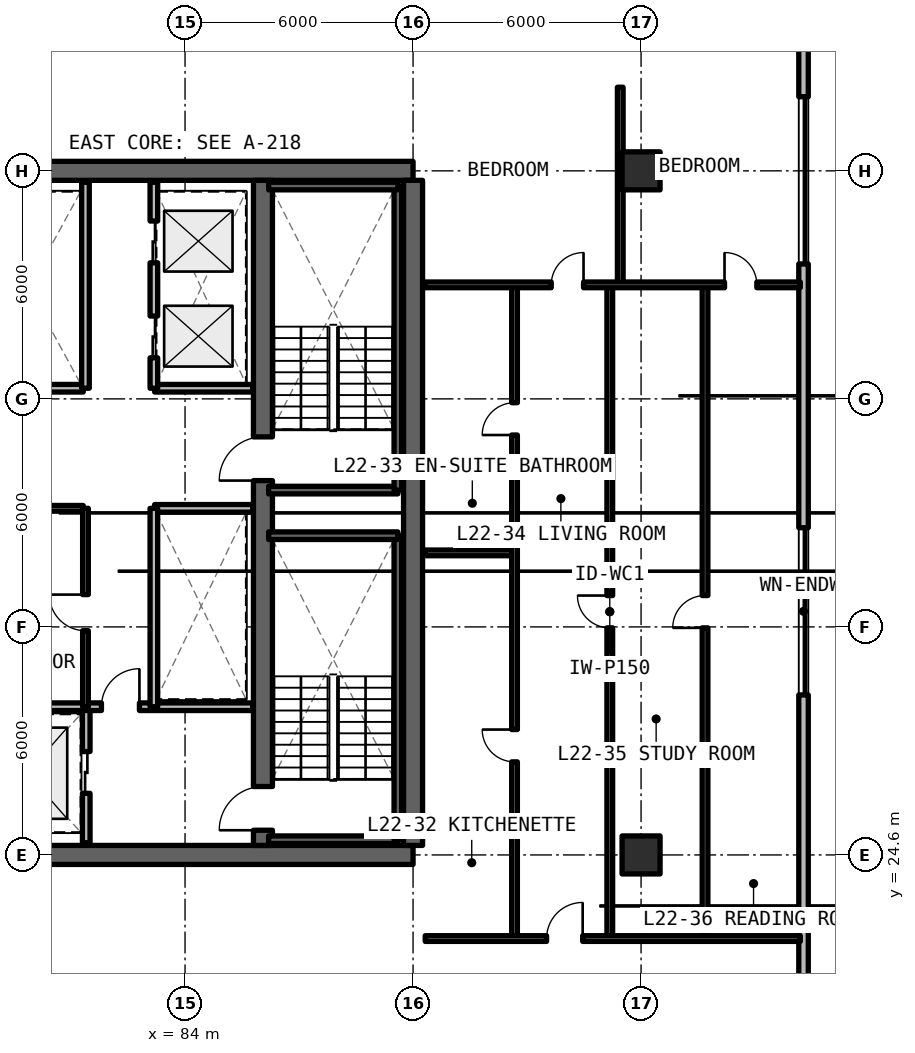
"""IFC4 building model, lengths in metres.
Left out: names, types, materials, properties, quantities, classifications, styles, units other than length and angle.
Written with IfcOpenShell. Run it as: python <this file> out.ifc"""

import sys

from ifc_helpers import new_model, si_unit, direction, frame, frame_2d, origin, origin_2d, place, context, subcontext, project, spatial, rectangle, extrude, element, fill, save


model = new_model("IFC4")
c1 = context("Model", 3, precision=1e-05, world=origin(), true_north=direction((0.0, 1.0)))
c2 = subcontext(c1, "Body", "Model", "MODEL_VIEW")
j1 = project(units=[si_unit("LENGTHUNIT", "METRE"), si_unit("PLANEANGLEUNIT", "RADIAN")], contexts=[c1])
p1 = place(None, origin())
s1 = spatial("IfcSite", under=j1, at=p1, CompositionType="ELEMENT")
p2 = place(p1, origin())
s2 = spatial("IfcBuilding", under=s1, at=p2, CompositionType="ELEMENT")
p3 = place(p2, frame((0.0, 0.0, 82.17)))
s3 = spatial("IfcBuildingStorey", under=s2, at=p3, CompositionType="ELEMENT", Elevation=82.17)
for number, where, z_axis, x_axis in (
    (1, (78.0, 24.6, 0.0), (0.0, 0.0, 1.0), (1.0, 0.0, 0.0)),
    (2, (90.0, 42.6, 0.0), (0.0, 0.0, 1.0), (-1.0, 0.0, 0.0)),
):
    element("IfcWall", number, at=place(p3, frame(where, z_axis=z_axis, x_axis=x_axis)), inside=s3, PredefinedType="SHEAR", context=c2, shape_type="SweptSolid", body=[
        extrude(rectangle(XDim=12.0, YDim=0.5, at=frame_2d((6.0, 0.0))), origin(), (0.0, 0.0, 1.0), 3.3),
    ])
p4 = place(p3, frame((90.0, 24.85, 0.0), z_axis=(0.0, 0.0, 1.0), x_axis=(0.0, 1.0, 0.0)))
e3 = element("IfcWall", 3, at=p4, inside=s3, PredefinedType="SHEAR", context=c2, shape_type="SweptSolid", body=[
    extrude(rectangle(XDim=17.5, YDim=0.5, at=frame_2d((8.75, 0.0))), origin(), (0.0, 0.0, 1.0), 3.3),
])
p5 = place(p3, frame((86.05, 24.85, 0.0), z_axis=(0.0, 0.0, 1.0), x_axis=(0.0, 1.0, 0.0)))
e4 = element("IfcWall", 4, at=p5, inside=s3, PredefinedType="SHEAR", context=c2, shape_type="SweptSolid", body=[
    extrude(rectangle(XDim=17.5, YDim=0.5, at=frame_2d((8.75, 0.0))), origin(), (0.0, 0.0, 1.0), 3.3),
])
p6 = place(p5, frame((0.4, 0.0, 0.0)))
e5 = element("IfcOpeningElement", 5, at=p6, cuts=e4, PredefinedType="OPENING", context=c2, shape_type="SweptSolid", body=[
    extrude(rectangle(XDim=1.15, YDim=2.15, at=frame_2d((0.575, 1.075))), frame((0.0, 0.26, 0.0), z_axis=(0.0, -1.0, 0.0), x_axis=(1.0, 0.0, 0.0)), (0.0, 0.0, 1.0), 0.52),
])
p7 = place(p5, frame((9.6, 0.0, 0.0)))
e6 = element("IfcOpeningElement", 6, at=p7, cuts=e4, PredefinedType="OPENING", context=c2, shape_type="SweptSolid", body=[
    extrude(rectangle(XDim=1.15, YDim=2.15, at=frame_2d((0.575, 1.075))), frame((0.0, 0.26, 0.0), z_axis=(0.0, -1.0, 0.0), x_axis=(1.0, 0.0, 0.0)), (0.0, 0.0, 1.0), 0.52),
])
for number, where, z_axis, x_axis in (
    (7, (96.0, 24.6, 0.0), (0.0, 0.0, 1.0), (1.0, 0.0, 0.0)),
    (8, (96.0, 42.6, 0.0), (0.0, 0.0, 1.0), (1.0, 0.0, 0.0)),
):
    element("IfcColumn", number, at=place(p3, frame(where, z_axis=z_axis, x_axis=x_axis)), inside=s3, PredefinedType="COLUMN", context=c2, shape_type="SweptSolid", body=[
        extrude(rectangle(XDim=1.0, YDim=1.0, at=origin_2d()), origin(), (0.0, 0.0, 1.0), 3.3),
    ])
p8 = place(p3, frame((100.275, 13.852, 0.0), z_axis=(0.0, 0.0, 1.0), x_axis=(0.0, 1.0, 0.0)))
e9 = element("IfcWall", 9, at=p8, inside=s3, PredefinedType="SOLIDWALL", context=c2, shape_type="SweptSolid", body=[
    extrude(rectangle(XDim=39.496, YDim=0.25, at=frame_2d((19.748, 0.0))), origin(), (0.0, 0.0, 1.0), 3.08),
])
p9 = place(p8, frame((36.448, 0.0, 0.0)))
e10 = element("IfcOpeningElement", 10, at=p9, cuts=e9, PredefinedType="OPENING", context=c2, shape_type="SweptSolid", body=[
    extrude(rectangle(XDim=1.1, YDim=2.15, at=frame_2d((0.55, 1.075))), frame((0.0, 0.135, 0.0), z_axis=(0.0, -1.0, 0.0), x_axis=(1.0, 0.0, 0.0)), (0.0, 0.0, 1.0), 0.27),
])
p10 = place(p8, frame((14.958, 0.0, 0.78)))
e11 = element("IfcOpeningElement", 11, at=p10, cuts=e9, PredefinedType="OPENING", context=c2, shape_type="SweptSolid", body=[
    extrude(rectangle(XDim=4.4, YDim=1.66, at=frame_2d((2.2, 0.83))), frame((0.0, 0.135, 0.0), z_axis=(0.0, -1.0, 0.0), x_axis=(1.0, 0.0, 0.0)), (0.0, 0.0, 1.0), 0.27),
])
p11 = place(p8, frame((26.298, 0.0, 0.78)))
e12 = element("IfcOpeningElement", 12, at=p11, cuts=e9, PredefinedType="OPENING", context=c2, shape_type="SweptSolid", body=[
    extrude(rectangle(XDim=4.4, YDim=1.66, at=frame_2d((2.2, 0.83))), frame((0.0, 0.135, 0.0), z_axis=(0.0, -1.0, 0.0), x_axis=(1.0, 0.0, 0.0)), (0.0, 0.0, 1.0), 0.27),
])
p12 = place(p8, frame((2.454, 0.0, 0.78)))
e13 = element("IfcOpeningElement", 13, at=p12, cuts=e9, PredefinedType="OPENING", context=c2, shape_type="SweptSolid", body=[
    extrude(rectangle(XDim=1.4, YDim=1.65, at=frame_2d((0.7, 0.825))), frame((0.0, 0.135, 0.0), z_axis=(0.0, -1.0, 0.0), x_axis=(1.0, 0.0, 0.0)), (0.0, 0.0, 1.0), 0.27),
])
p13 = place(p3, frame((81.4, 24.92, 0.0), z_axis=(0.0, 0.0, 1.0), x_axis=(0.0, 1.0, 0.0)))
e14 = element("IfcWall", 14, at=p13, inside=s3, PredefinedType="SOLIDWALL", context=c2, shape_type="SweptSolid", body=[
    extrude(rectangle(XDim=3.58, YDim=0.2, at=frame_2d((1.79, 0.0))), origin(), (0.0, 0.0, 1.0), 2.35),
])
p14 = place(p13, frame((1.3, 0.0, 0.0)))
e15 = element("IfcOpeningElement", 15, at=p14, cuts=e14, PredefinedType="OPENING", context=c2, shape_type="SweptSolid", body=[
    extrude(rectangle(XDim=1.1, YDim=2.2, at=frame_2d((0.55, 1.1))), frame((0.0, 0.11, 0.0), z_axis=(0.0, -1.0, 0.0), x_axis=(1.0, 0.0, 0.0)), (0.0, 0.0, 1.0), 0.22),
])
p15 = place(p3, frame((78.27, 28.5, 0.0), z_axis=(0.0, 0.0, 1.0), x_axis=(1.0, 0.0, 0.0)))
e16 = element("IfcWall", 16, at=p15, inside=s3, PredefinedType="SOLIDWALL", context=c2, shape_type="SweptSolid", body=[
    extrude(rectangle(XDim=7.51, YDim=0.2, at=frame_2d((3.755, 0.0))), origin(), (0.0, 0.0, 1.0), 2.35),
])
p16 = place(p15, frame((3.53, 0.0, 0.0)))
e17 = element("IfcOpeningElement", 17, at=p16, cuts=e16, PredefinedType="OPENING", context=c2, shape_type="SweptSolid", body=[
    extrude(rectangle(XDim=1.0, YDim=2.15, at=frame_2d((0.5, 1.075))), frame((0.0, 0.11, 0.0), z_axis=(0.0, -1.0, 0.0), x_axis=(1.0, 0.0, 0.0)), (0.0, 0.0, 1.0), 0.22),
])
p17 = place(p3, frame((83.2, 33.72, 0.0), z_axis=(0.0, 0.0, 1.0), x_axis=(1.0, 0.0, 0.0)))
e18 = element("IfcWall", 18, at=p17, inside=s3, PredefinedType="SOLIDWALL", context=c2, shape_type="SweptSolid", body=[
    extrude(rectangle(XDim=2.58, YDim=0.2, at=frame_2d((1.29, 0.0))), origin(), (0.0, 0.0, 1.0), 2.35),
])
p18 = place(p3, frame((83.18, 28.5, 0.0), z_axis=(0.0, 0.0, 1.0), x_axis=(0.0, 1.0, 0.0)))
e19 = element("IfcWall", 19, at=p18, inside=s3, PredefinedType="SOLIDWALL", context=c2, shape_type="SweptSolid", body=[
    extrude(rectangle(XDim=5.22, YDim=0.2, at=frame_2d((2.61, 0.0))), origin(), (0.0, 0.0, 1.0), 2.35),
])
p19 = place(p3, frame((79.76, 33.72, 0.0), z_axis=(0.0, 0.0, 1.0), x_axis=(1.0, 0.0, 0.0)))
e20 = element("IfcWall", 20, at=p19, inside=s3, PredefinedType="SOLIDWALL", context=c2, shape_type="SweptSolid", body=[
    extrude(rectangle(XDim=1.56, YDim=0.15, at=frame_2d((0.78, 0.0))), origin(), (0.0, 0.0, 1.0), 2.35),
])
p20 = place(p3, frame((81.38, 28.5, 0.0), z_axis=(0.0, 0.0, 1.0), x_axis=(0.0, 1.0, 0.0)))
e21 = element("IfcWall", 21, at=p20, inside=s3, PredefinedType="SOLIDWALL", context=c2, shape_type="SweptSolid", body=[
    extrude(rectangle(XDim=5.22, YDim=0.15, at=frame_2d((2.61, 0.0))), origin(), (0.0, 0.0, 1.0), 2.35),
])
p21 = place(p20, frame((2.0, 0.0, 0.0)))
e22 = element("IfcOpeningElement", 22, at=p21, cuts=e21, PredefinedType="OPENING", context=c2, shape_type="SweptSolid", body=[
    extrude(rectangle(XDim=0.95, YDim=2.15, at=frame_2d((0.475, 1.075))), frame((0.0, 0.085, 0.0), z_axis=(0.0, -1.0, 0.0), x_axis=(1.0, 0.0, 0.0)), (0.0, 0.0, 1.0), 0.17),
])
p22 = place(p3, frame((83.2, 36.88, 0.0), z_axis=(0.0, 0.0, 1.0), x_axis=(1.0, 0.0, 0.0)))
e23 = element("IfcWall", 23, at=p22, inside=s3, PredefinedType="SOLIDWALL", context=c2, shape_type="SweptSolid", body=[
    extrude(rectangle(XDim=2.58, YDim=0.2, at=frame_2d((1.29, 0.0))), origin(), (0.0, 0.0, 1.0), 2.35),
])
p23 = place(p3, frame((83.18, 36.88, 0.0), z_axis=(0.0, 0.0, 1.0), x_axis=(0.0, 1.0, 0.0)))
e24 = element("IfcWall", 24, at=p23, inside=s3, PredefinedType="SOLIDWALL", context=c2, shape_type="SweptSolid", body=[
    extrude(rectangle(XDim=5.42, YDim=0.2, at=frame_2d((2.71, 0.0))), origin(), (0.0, 0.0, 1.0), 2.35),
])
p24 = place(p23, frame((0.8, 0.0, 0.0)))
e25 = element("IfcOpeningElement", 25, at=p24, cuts=e24, PredefinedType="OPENING", context=c2, shape_type="SweptSolid", body=[
    extrude(rectangle(XDim=1.1, YDim=2.2, at=frame_2d((0.55, 1.1))), frame((0.0, 0.11, 0.0), z_axis=(0.0, -1.0, 0.0), x_axis=(1.0, 0.0, 0.0)), (0.0, 0.0, 1.0), 0.22),
])
p25 = place(p23, frame((3.3, 0.0, 0.0)))
e26 = element("IfcOpeningElement", 26, at=p25, cuts=e24, PredefinedType="OPENING", context=c2, shape_type="SweptSolid", body=[
    extrude(rectangle(XDim=1.1, YDim=2.2, at=frame_2d((0.55, 1.1))), frame((0.0, 0.11, 0.0), z_axis=(0.0, -1.0, 0.0), x_axis=(1.0, 0.0, 0.0)), (0.0, 0.0, 1.0), 0.22),
])
p26 = place(p3, frame((78.27, 36.88, 0.0), z_axis=(0.0, 0.0, 1.0), x_axis=(1.0, 0.0, 0.0)))
e27 = element("IfcWall", 27, at=p26, inside=s3, PredefinedType="SOLIDWALL", context=c2, shape_type="SweptSolid", body=[
    extrude(rectangle(XDim=3.05, YDim=0.2, at=frame_2d((1.525, 0.0))), origin(), (0.0, 0.0, 1.0), 2.35),
])
p27 = place(p3, frame((81.38, 36.88, 0.0), z_axis=(0.0, 0.0, 1.0), x_axis=(0.0, 1.0, 0.0)))
e28 = element("IfcWall", 28, at=p27, inside=s3, PredefinedType="SOLIDWALL", context=c2, shape_type="SweptSolid", body=[
    extrude(rectangle(XDim=5.42, YDim=0.2, at=frame_2d((2.71, 0.0))), origin(), (0.0, 0.0, 1.0), 2.35),
])
p28 = place(p3, frame((95.177, 22.4, 0.0), z_axis=(0.0, 0.0, 1.0), x_axis=(0.0, 1.0, 0.0)))
e29 = element("IfcWall", 29, at=p28, inside=s3, PredefinedType="PARTITIONING", context=c2, shape_type="SweptSolid", body=[
    extrude(rectangle(XDim=17.2, YDim=0.15, at=frame_2d((8.6, 0.0))), origin(), (0.0, 0.0, 1.0), 2.35),
])
p29 = place(p28, frame((8.175, 0.0, 0.0)))
e30 = element("IfcOpeningElement", 30, at=p29, cuts=e29, PredefinedType="OPENING", context=c2, shape_type="SweptSolid", body=[
    extrude(rectangle(XDim=0.85, YDim=2.1, at=frame_2d((0.425, 1.05))), frame((0.0, 0.085, 0.0), z_axis=(0.0, -1.0, 0.0), x_axis=(1.0, 0.0, 0.0)), (0.0, 0.0, 1.0), 0.17),
])
p30 = place(p3, frame((97.683, 22.4, 0.0), z_axis=(0.0, 0.0, 1.0), x_axis=(0.0, 1.0, 0.0)))
e31 = element("IfcWall", 31, at=p30, inside=s3, PredefinedType="PARTITIONING", context=c2, shape_type="SweptSolid", body=[
    extrude(rectangle(XDim=17.2, YDim=0.15, at=frame_2d((8.6, 0.0))), origin(), (0.0, 0.0, 1.0), 2.35),
])
p31 = place(p30, frame((8.175, 0.0, 0.0)))
e32 = element("IfcOpeningElement", 32, at=p31, cuts=e31, PredefinedType="OPENING", context=c2, shape_type="SweptSolid", body=[
    extrude(rectangle(XDim=0.85, YDim=2.1, at=frame_2d((0.425, 1.05))), frame((0.0, 0.085, 0.0), z_axis=(0.0, -1.0, 0.0), x_axis=(1.0, 0.0, 0.0)), (0.0, 0.0, 1.0), 0.17),
])
p32 = place(p3, frame((90.32, 32.548, 0.0), z_axis=(0.0, 0.0, 1.0), x_axis=(1.0, 0.0, 0.0)))
e33 = element("IfcWall", 33, at=p32, inside=s3, PredefinedType="PARTITIONING", context=c2, shape_type="SweptSolid", body=[
    extrude(rectangle(XDim=2.35, YDim=0.15, at=frame_2d((1.175, 0.0))), origin(), (0.0, 0.0, 1.0), 2.35),
])
p33 = place(p3, frame((92.67, 22.4, 0.0), z_axis=(0.0, 0.0, 1.0), x_axis=(0.0, 1.0, 0.0)))
e34 = element("IfcWall", 34, at=p33, inside=s3, PredefinedType="PARTITIONING", context=c2, shape_type="SweptSolid", body=[
    extrude(rectangle(XDim=17.2, YDim=0.15, at=frame_2d((8.6, 0.0))), origin(), (0.0, 0.0, 1.0), 2.35),
])
p34 = place(p33, frame((4.649, 0.0, 0.0)))
e35 = element("IfcOpeningElement", 35, at=p34, cuts=e34, PredefinedType="OPENING", context=c2, shape_type="SweptSolid", body=[
    extrude(rectangle(XDim=0.85, YDim=2.1, at=frame_2d((0.425, 1.05))), frame((0.0, 0.085, 0.0), z_axis=(0.0, -1.0, 0.0), x_axis=(1.0, 0.0, 0.0)), (0.0, 0.0, 1.0), 0.17),
])
p35 = place(p33, frame((13.249, 0.0, 0.0)))
e36 = element("IfcOpeningElement", 36, at=p35, cuts=e34, PredefinedType="OPENING", context=c2, shape_type="SweptSolid", body=[
    extrude(rectangle(XDim=0.85, YDim=2.1, at=frame_2d((0.425, 1.05))), frame((0.0, 0.085, 0.0), z_axis=(0.0, -1.0, 0.0), x_axis=(1.0, 0.0, 0.0)), (0.0, 0.0, 1.0), 0.17),
])
p36 = place(p3, frame((95.452, 39.6, 0.0), z_axis=(0.0, 0.0, 1.0), x_axis=(0.0, 1.0, 0.0)))
e37 = element("IfcWall", 37, at=p36, inside=s3, PredefinedType="PARTITIONING", context=c2, shape_type="SweptSolid", body=[
    extrude(rectangle(XDim=5.2, YDim=0.15, at=frame_2d((2.6, 0.0))), origin(), (0.0, 0.0, 1.0), 2.35),
])
p37 = place(p3, frame((90.32, 39.6, 0.0), z_axis=(0.0, 0.0, 1.0), x_axis=(1.0, 0.0, 0.0)))
e38 = element("IfcWall", 38, at=p37, inside=s3, PredefinedType="PARTITIONING", context=c2, shape_type="SweptSolid", body=[
    extrude(rectangle(XDim=9.87, YDim=0.15, at=frame_2d((4.935, 0.0))), origin(), (0.0, 0.0, 1.0), 2.35),
])
p38 = place(p37, frame((3.316, 0.0, 0.0)))
e39 = element("IfcOpeningElement", 39, at=p38, cuts=e38, PredefinedType="OPENING", context=c2, shape_type="SweptSolid", body=[
    extrude(rectangle(XDim=0.85, YDim=2.1, at=frame_2d((0.425, 1.05))), frame((0.0, 0.085, 0.0), z_axis=(0.0, -1.0, 0.0), x_axis=(1.0, 0.0, 0.0)), (0.0, 0.0, 1.0), 0.17),
])
p39 = place(p37, frame((7.876, 0.0, 0.0)))
e40 = element("IfcOpeningElement", 40, at=p39, cuts=e38, PredefinedType="OPENING", context=c2, shape_type="SweptSolid", body=[
    extrude(rectangle(XDim=0.85, YDim=2.1, at=frame_2d((0.425, 1.05))), frame((0.0, 0.085, 0.0), z_axis=(0.0, -1.0, 0.0), x_axis=(1.0, 0.0, 0.0)), (0.0, 0.0, 1.0), 0.17),
])
p40 = place(p3, frame((90.32, 22.4, 0.0), z_axis=(0.0, 0.0, 1.0), x_axis=(1.0, 0.0, 0.0)))
e41 = element("IfcWall", 41, at=p40, inside=s3, PredefinedType="SOLIDWALL", context=c2, shape_type="SweptSolid", body=[
    extrude(rectangle(XDim=9.87, YDim=0.15, at=frame_2d((4.935, 0.0))), origin(), (0.0, 0.0, 1.0), 2.35),
])
p41 = place(p40, frame((3.193, 0.0, 0.0)))
e42 = element("IfcOpeningElement", 42, at=p41, cuts=e41, PredefinedType="OPENING", context=c2, shape_type="SweptSolid", body=[
    extrude(rectangle(XDim=0.95, YDim=2.15, at=frame_2d((0.475, 1.075))), frame((0.0, 0.085, 0.0), z_axis=(0.0, -1.0, 0.0), x_axis=(1.0, 0.0, 0.0)), (0.0, 0.0, 1.0), 0.17),
])
p42 = place(p3, frame((86.2, 25.0, 0.0), z_axis=(0.0, 0.0, 1.0), x_axis=(1.0, 0.0, 0.0)))
e43 = element("IfcWall", 43, at=p42, inside=s3, PredefinedType="SOLIDWALL", context=c2, shape_type="SweptSolid", body=[
    extrude(rectangle(XDim=3.4, YDim=0.2, at=frame_2d((1.7, 0.0))), origin(), (0.0, 0.0, 1.0), 3.3),
])
p43 = place(p3, frame((89.6, 25.0, 0.0), z_axis=(0.0, 0.0, 1.0), x_axis=(0.0, 1.0, 0.0)))
e44 = element("IfcWall", 44, at=p43, inside=s3, PredefinedType="SOLIDWALL", context=c2, shape_type="SweptSolid", body=[
    extrude(rectangle(XDim=8.0, YDim=0.2, at=frame_2d((4.0, 0.0))), origin(), (0.0, 0.0, 1.0), 3.3),
])
for number, where, z_axis, x_axis in (
    (45, (89.6, 33.0, 0.0), (0.0, 0.0, 1.0), (-1.0, 0.0, 0.0)),
    (46, (86.2, 34.2, 0.0), (0.0, 0.0, 1.0), (1.0, 0.0, 0.0)),
):
    element("IfcWall", number, at=place(p3, frame(where, z_axis=z_axis, x_axis=x_axis)), inside=s3, PredefinedType="SOLIDWALL", context=c2, shape_type="SweptSolid", body=[
        extrude(rectangle(XDim=3.4, YDim=0.2, at=frame_2d((1.7, 0.0))), origin(), (0.0, 0.0, 1.0), 3.3),
    ])
p44 = place(p3, frame((89.6, 34.2, 0.0), z_axis=(0.0, 0.0, 1.0), x_axis=(0.0, 1.0, 0.0)))
e47 = element("IfcWall", 47, at=p44, inside=s3, PredefinedType="SOLIDWALL", context=c2, shape_type="SweptSolid", body=[
    extrude(rectangle(XDim=8.0, YDim=0.2, at=frame_2d((4.0, 0.0))), origin(), (0.0, 0.0, 1.0), 3.3),
])
p45 = place(p3, frame((89.6, 42.2, 0.0), z_axis=(0.0, 0.0, 1.0), x_axis=(-1.0, 0.0, 0.0)))
e48 = element("IfcWall", 48, at=p45, inside=s3, PredefinedType="SOLIDWALL", context=c2, shape_type="SweptSolid", body=[
    extrude(rectangle(XDim=3.4, YDim=0.2, at=frame_2d((1.7, 0.0))), origin(), (0.0, 0.0, 1.0), 3.3),
])
p46 = place(p10, origin())
e49 = element("IfcWindow", 49, at=p46, inside=s3, PartitioningType="SINGLE_PANEL", PredefinedType="WINDOW", context=c2, shape_type="SweptSolid", body=[
    extrude(rectangle(XDim=4.4, YDim=1.66, at=frame_2d((2.2, 0.83))), frame((0.0, 0.03, 0.0), z_axis=(0.0, -1.0, 0.0), x_axis=(1.0, 0.0, 0.0)), (0.0, 0.0, 1.0), 0.06),
])
fill(e11, e49)
p47 = place(p11, origin())
e50 = element("IfcWindow", 50, at=p47, inside=s3, PartitioningType="SINGLE_PANEL", PredefinedType="WINDOW", context=c2, shape_type="SweptSolid", body=[
    extrude(rectangle(XDim=4.4, YDim=1.66, at=frame_2d((2.2, 0.83))), frame((0.0, 0.03, 0.0), z_axis=(0.0, -1.0, 0.0), x_axis=(1.0, 0.0, 0.0)), (0.0, 0.0, 1.0), 0.06),
])
fill(e12, e50)
p48 = place(p14, origin())
e51 = element("IfcDoor", 51, at=p48, inside=s3, OperationType="SLIDING_TO_LEFT", PredefinedType="DOOR", context=c2, shape_type="SweptSolid", body=[
    extrude(rectangle(XDim=1.1, YDim=2.2, at=frame_2d((0.55, 1.1))), frame((0.0, 0.025, 0.0), z_axis=(0.0, -1.0, 0.0), x_axis=(1.0, 0.0, 0.0)), (0.0, 0.0, 1.0), 0.05),
])
fill(e15, e51)
p49 = place(p16, origin())
e52 = element("IfcDoor", 52, at=p49, inside=s3, OperationType="SINGLE_SWING_RIGHT", PredefinedType="DOOR", context=c2, shape_type="SweptSolid", body=[
    extrude(rectangle(XDim=1.0, YDim=2.15, at=frame_2d((0.5, 1.075))), frame((0.0, 0.025, 0.0), z_axis=(0.0, -1.0, 0.0), x_axis=(1.0, 0.0, 0.0)), (0.0, 0.0, 1.0), 0.05),
])
fill(e17, e52)
p50 = place(p21, origin())
e53 = element("IfcDoor", 53, at=p50, inside=s3, OperationType="SINGLE_SWING_RIGHT", PredefinedType="DOOR", context=c2, shape_type="SweptSolid", body=[
    extrude(rectangle(XDim=0.95, YDim=2.15, at=frame_2d((0.475, 1.075))), frame((0.0, 0.025, 0.0), z_axis=(0.0, -1.0, 0.0), x_axis=(1.0, 0.0, 0.0)), (0.0, 0.0, 1.0), 0.05),
])
fill(e22, e53)
p51 = place(p24, origin())
e54 = element("IfcDoor", 54, at=p51, inside=s3, OperationType="SLIDING_TO_LEFT", PredefinedType="DOOR", context=c2, shape_type="SweptSolid", body=[
    extrude(rectangle(XDim=1.1, YDim=2.2, at=frame_2d((0.55, 1.1))), frame((0.0, 0.025, 0.0), z_axis=(0.0, -1.0, 0.0), x_axis=(1.0, 0.0, 0.0)), (0.0, 0.0, 1.0), 0.05),
])
fill(e25, e54)
p52 = place(p25, origin())
e55 = element("IfcDoor", 55, at=p52, inside=s3, OperationType="SLIDING_TO_RIGHT", PredefinedType="DOOR", context=c2, shape_type="SweptSolid", body=[
    extrude(rectangle(XDim=1.1, YDim=2.2, at=frame_2d((0.55, 1.1))), frame((0.0, 0.025, 0.0), z_axis=(0.0, -1.0, 0.0), x_axis=(1.0, 0.0, 0.0)), (0.0, 0.0, 1.0), 0.05),
])
fill(e26, e55)
p53 = place(p29, origin())
e56 = element("IfcDoor", 56, at=p53, inside=s3, OperationType="SINGLE_SWING_RIGHT", PredefinedType="DOOR", context=c2, shape_type="SweptSolid", body=[
    extrude(rectangle(XDim=0.85, YDim=2.1, at=frame_2d((0.425, 1.05))), frame((0.0, 0.025, 0.0), z_axis=(0.0, -1.0, 0.0), x_axis=(1.0, 0.0, 0.0)), (0.0, 0.0, 1.0), 0.05),
])
fill(e30, e56)
p54 = place(p31, origin())
e57 = element("IfcDoor", 57, at=p54, inside=s3, OperationType="SINGLE_SWING_LEFT", PredefinedType="DOOR", context=c2, shape_type="SweptSolid", body=[
    extrude(rectangle(XDim=0.85, YDim=2.1, at=frame_2d((0.425, 1.05))), frame((0.0, 0.025, 0.0), z_axis=(0.0, -1.0, 0.0), x_axis=(1.0, 0.0, 0.0)), (0.0, 0.0, 1.0), 0.05),
])
fill(e32, e57)
p55 = place(p34, origin())
e58 = element("IfcDoor", 58, at=p55, inside=s3, OperationType="SINGLE_SWING_RIGHT", PredefinedType="DOOR", context=c2, shape_type="SweptSolid", body=[
    extrude(rectangle(XDim=0.85, YDim=2.1, at=frame_2d((0.425, 1.05))), frame((0.0, 0.025, 0.0), z_axis=(0.0, -1.0, 0.0), x_axis=(1.0, 0.0, 0.0)), (0.0, 0.0, 1.0), 0.05),
])
fill(e35, e58)
p56 = place(p35, origin())
e59 = element("IfcDoor", 59, at=p56, inside=s3, OperationType="SINGLE_SWING_LEFT", PredefinedType="DOOR", context=c2, shape_type="SweptSolid", body=[
    extrude(rectangle(XDim=0.85, YDim=2.1, at=frame_2d((0.425, 1.05))), frame((0.0, 0.025, 0.0), z_axis=(0.0, -1.0, 0.0), x_axis=(1.0, 0.0, 0.0)), (0.0, 0.0, 1.0), 0.05),
])
fill(e36, e59)
p57 = place(p38, origin())
e60 = element("IfcDoor", 60, at=p57, inside=s3, OperationType="SINGLE_SWING_RIGHT", PredefinedType="DOOR", context=c2, shape_type="SweptSolid", body=[
    extrude(rectangle(XDim=0.85, YDim=2.1, at=frame_2d((0.425, 1.05))), frame((0.0, 0.025, 0.0), z_axis=(0.0, -1.0, 0.0), x_axis=(1.0, 0.0, 0.0)), (0.0, 0.0, 1.0), 0.05),
])
fill(e39, e60)
p58 = place(p39, origin())
e61 = element("IfcDoor", 61, at=p58, inside=s3, OperationType="SINGLE_SWING_LEFT", PredefinedType="DOOR", context=c2, shape_type="SweptSolid", body=[
    extrude(rectangle(XDim=0.85, YDim=2.1, at=frame_2d((0.425, 1.05))), frame((0.0, 0.025, 0.0), z_axis=(0.0, -1.0, 0.0), x_axis=(1.0, 0.0, 0.0)), (0.0, 0.0, 1.0), 0.05),
])
fill(e40, e61)
p59 = place(p41, origin())
e62 = element("IfcDoor", 62, at=p59, inside=s3, OperationType="SINGLE_SWING_RIGHT", PredefinedType="DOOR", context=c2, shape_type="SweptSolid", body=[
    extrude(rectangle(XDim=0.95, YDim=2.15, at=frame_2d((0.475, 1.075))), frame((0.0, 0.025, 0.0), z_axis=(0.0, -1.0, 0.0), x_axis=(1.0, 0.0, 0.0)), (0.0, 0.0, 1.0), 0.05),
])
fill(e42, e62)
p60 = place(p6, origin())
e63 = element("IfcDoor", 63, at=p60, inside=s3, OperationType="SINGLE_SWING_LEFT", PredefinedType="DOOR", context=c2, shape_type="SweptSolid", body=[
    extrude(rectangle(XDim=1.15, YDim=2.15, at=frame_2d((0.575, 1.075))), frame((0.0, 0.025, 0.0), z_axis=(0.0, -1.0, 0.0), x_axis=(1.0, 0.0, 0.0)), (0.0, 0.0, 1.0), 0.05),
])
fill(e5, e63)
p61 = place(p7, origin())
e64 = element("IfcDoor", 64, at=p61, inside=s3, OperationType="SINGLE_SWING_RIGHT", PredefinedType="DOOR", context=c2, shape_type="SweptSolid", body=[
    extrude(rectangle(XDim=1.15, YDim=2.15, at=frame_2d((0.575, 1.075))), frame((0.0, 0.025, 0.0), z_axis=(0.0, -1.0, 0.0), x_axis=(1.0, 0.0, 0.0)), (0.0, 0.0, 1.0), 0.05),
])
fill(e6, e64)
save(model, sys.argv[1])
